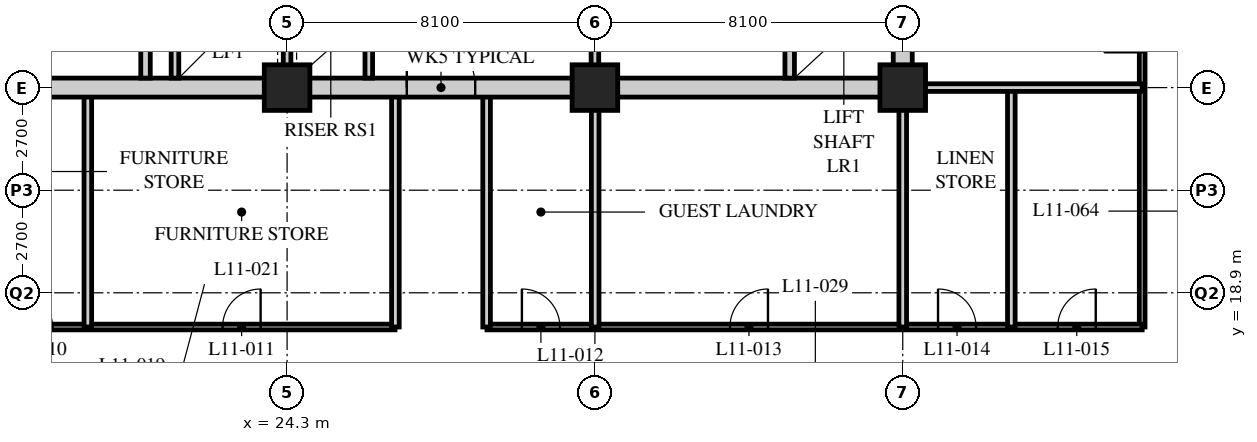
"""IFC4 building model, lengths in metres.
Left out: names, types, materials, properties, quantities, classifications, styles, units other than length and angle.
Written with IfcOpenShell. Run it as: python <this file> out.ifc"""

import sys

from ifc_helpers import new_model, si_unit, direction, frame, frame_2d, origin, origin_2d, place, context, subcontext, project, spatial, rectangle, hollow_rectangle, extrude, element, fill, save


model = new_model("IFC4")
c1 = context("Model", 3, precision=1e-05, world=origin(), true_north=direction((0.0, 1.0)))
c2 = subcontext(c1, "Body", "Model", "MODEL_VIEW")
j1 = project(units=[si_unit("LENGTHUNIT", "METRE"), si_unit("PLANEANGLEUNIT", "RADIAN")], contexts=[c1])
p1 = place(None, origin())
s1 = spatial("IfcSite", under=j1, at=p1, CompositionType="ELEMENT")
p2 = place(p1, origin())
s2 = spatial("IfcBuilding", under=s1, at=p2, CompositionType="ELEMENT")
p3 = place(p2, frame((0.0, 0.0, 50.0)))
s3 = spatial("IfcBuildingStorey", under=s2, at=p3, CompositionType="ELEMENT", Elevation=50.0)
for number, where, z_axis, x_axis in (
    (1, (24.3, 24.3, 0.0), (0.0, 0.0, 1.0), (1.0, 0.0, 0.0)),
    (2, (32.4, 24.3, 0.0), (0.0, 0.0, 1.0), (1.0, 0.0, 0.0)),
    (3, (40.5, 24.3, 0.0), (0.0, 0.0, 1.0), (1.0, 0.0, 0.0)),
):
    element("IfcColumn", number, at=place(p3, frame(where, z_axis=z_axis, x_axis=x_axis)), inside=s3, PredefinedType="COLUMN", context=c2, shape_type="SweptSolid", body=[
        extrude(hollow_rectangle(XDim=1.2, YDim=1.2, WallThickness=0.12, at=origin_2d()), origin(), (0.0, 0.0, 1.0), 3.4),
    ])
p4 = place(p3, frame((46.8, 18.0, 0.0), z_axis=(0.0, 0.0, 1.0), x_axis=(0.0, 1.0, 0.0)))
e4 = element("IfcWall", 4, at=p4, inside=s3, PredefinedType="PARTITIONING", context=c2, shape_type="SweptSolid", body=[
    extrude(rectangle(XDim=22.5, YDim=0.15, at=frame_2d((11.25, 0.0))), origin(), (0.0, 0.0, 1.0), 3.19),
])
p5 = place(p4, frame((7.229, 0.0, 0.0)))
e5 = element("IfcOpeningElement", 5, at=p5, cuts=e4, PredefinedType="OPENING", context=c2, shape_type="SweptSolid", body=[
    extrude(rectangle(XDim=1.0, YDim=2.1, at=frame_2d((0.5, 1.05))), frame((0.0, 0.085, 0.0), z_axis=(0.0, -1.0, 0.0), x_axis=(1.0, 0.0, 0.0)), (0.0, 0.0, 1.0), 0.17),
])
p6 = place(p4, frame((11.279, 0.0, 0.0)))
e6 = element("IfcOpeningElement", 6, at=p6, cuts=e4, PredefinedType="OPENING", context=c2, shape_type="SweptSolid", body=[
    extrude(rectangle(XDim=1.0, YDim=2.1, at=frame_2d((0.5, 1.05))), frame((0.0, 0.085, 0.0), z_axis=(0.0, -1.0, 0.0), x_axis=(1.0, 0.0, 0.0)), (0.0, 0.0, 1.0), 0.17),
])
p7 = place(p4, frame((17.95, 0.0, 0.0)))
e7 = element("IfcOpeningElement", 7, at=p7, cuts=e4, PredefinedType="OPENING", context=c2, shape_type="SweptSolid", body=[
    extrude(rectangle(XDim=1.0, YDim=2.1, at=frame_2d((0.5, 1.05))), frame((0.0, 0.085, 0.0), z_axis=(0.0, -1.0, 0.0), x_axis=(1.0, 0.0, 0.0)), (0.0, 0.0, 1.0), 0.17),
])
p8 = place(p3, frame((9.9, 18.0, 0.0), z_axis=(0.0, 0.0, 1.0), x_axis=(1.0, 0.0, 0.0)))
e8 = element("IfcWall", 8, at=p8, inside=s3, PredefinedType="PARTITIONING", context=c2, shape_type="SweptSolid", body=[
    extrude(rectangle(XDim=17.24, YDim=0.15, at=frame_2d((8.62, 0.0))), origin(), (0.0, 0.0, 1.0), 3.19),
])
p9 = place(p8, frame((0.3, 0.0, 0.0)))
e9 = element("IfcOpeningElement", 9, at=p9, cuts=e8, PredefinedType="OPENING", context=c2, shape_type="SweptSolid", body=[
    extrude(rectangle(XDim=1.0, YDim=2.1, at=frame_2d((0.5, 1.05))), frame((0.0, 0.085, 0.0), z_axis=(0.0, -1.0, 0.0), x_axis=(1.0, 0.0, 0.0)), (0.0, 0.0, 1.0), 0.17),
])
p10 = place(p8, frame((3.45, 0.0, 0.0)))
e10 = element("IfcOpeningElement", 10, at=p10, cuts=e8, PredefinedType="OPENING", context=c2, shape_type="SweptSolid", body=[
    extrude(rectangle(XDim=1.0, YDim=2.1, at=frame_2d((0.5, 1.05))), frame((0.0, 0.085, 0.0), z_axis=(0.0, -1.0, 0.0), x_axis=(1.0, 0.0, 0.0)), (0.0, 0.0, 1.0), 0.17),
])
p11 = place(p8, frame((7.229, 0.0, 0.0)))
e11 = element("IfcOpeningElement", 11, at=p11, cuts=e8, PredefinedType="OPENING", context=c2, shape_type="SweptSolid", body=[
    extrude(rectangle(XDim=1.0, YDim=2.1, at=frame_2d((0.5, 1.05))), frame((0.0, 0.085, 0.0), z_axis=(0.0, -1.0, 0.0), x_axis=(1.0, 0.0, 0.0)), (0.0, 0.0, 1.0), 0.17),
])
p12 = place(p8, frame((12.704, 0.0, 0.0)))
e12 = element("IfcOpeningElement", 12, at=p12, cuts=e8, PredefinedType="OPENING", context=c2, shape_type="SweptSolid", body=[
    extrude(rectangle(XDim=1.0, YDim=2.1, at=frame_2d((0.5, 1.05))), frame((0.0, 0.085, 0.0), z_axis=(0.0, -1.0, 0.0), x_axis=(1.0, 0.0, 0.0)), (0.0, 0.0, 1.0), 0.17),
])
p13 = place(p3, frame((29.56, 18.0, 0.0), z_axis=(0.0, 0.0, 1.0), x_axis=(1.0, 0.0, 0.0)))
e13 = element("IfcWall", 13, at=p13, inside=s3, PredefinedType="PARTITIONING", context=c2, shape_type="SweptSolid", body=[
    extrude(rectangle(XDim=17.24, YDim=0.15, at=frame_2d((8.62, 0.0))), origin(), (0.0, 0.0, 1.0), 3.19),
])
p14 = place(p13, frame((0.919, 0.0, 0.0)))
e14 = element("IfcOpeningElement", 14, at=p14, cuts=e13, PredefinedType="OPENING", context=c2, shape_type="SweptSolid", body=[
    extrude(rectangle(XDim=1.0, YDim=2.1, at=frame_2d((0.5, 1.05))), frame((0.0, 0.085, 0.0), z_axis=(0.0, -1.0, 0.0), x_axis=(1.0, 0.0, 0.0)), (0.0, 0.0, 1.0), 0.17),
])
p15 = place(p13, frame((6.394, 0.0, 0.0)))
e15 = element("IfcOpeningElement", 15, at=p15, cuts=e13, PredefinedType="OPENING", context=c2, shape_type="SweptSolid", body=[
    extrude(rectangle(XDim=1.0, YDim=2.1, at=frame_2d((0.5, 1.05))), frame((0.0, 0.085, 0.0), z_axis=(0.0, -1.0, 0.0), x_axis=(1.0, 0.0, 0.0)), (0.0, 0.0, 1.0), 0.17),
])
p16 = place(p13, frame((11.869, 0.0, 0.0)))
e16 = element("IfcOpeningElement", 16, at=p16, cuts=e13, PredefinedType="OPENING", context=c2, shape_type="SweptSolid", body=[
    extrude(rectangle(XDim=1.0, YDim=2.1, at=frame_2d((0.5, 1.05))), frame((0.0, 0.085, 0.0), z_axis=(0.0, -1.0, 0.0), x_axis=(1.0, 0.0, 0.0)), (0.0, 0.0, 1.0), 0.17),
])
p17 = place(p13, frame((15.019, 0.0, 0.0)))
e17 = element("IfcOpeningElement", 17, at=p17, cuts=e13, PredefinedType="OPENING", context=c2, shape_type="SweptSolid", body=[
    extrude(rectangle(XDim=1.0, YDim=2.1, at=frame_2d((0.5, 1.05))), frame((0.0, 0.085, 0.0), z_axis=(0.0, -1.0, 0.0), x_axis=(1.0, 0.0, 0.0)), (0.0, 0.0, 1.0), 0.17),
])
p18 = place(p3, frame((19.057, 18.0, 0.0), z_axis=(0.0, 0.0, 1.0), x_axis=(0.0, 1.0, 0.0)))
e18 = element("IfcWall", 18, at=p18, inside=s3, PredefinedType="SOLIDWALL", context=c2, shape_type="SweptSolid", body=[
    extrude(rectangle(XDim=6.3, YDim=0.2, at=frame_2d((3.15, 0.0))), origin(), (0.0, 0.0, 1.0), 3.19),
])
for number, where, z_axis, x_axis in (
    (19, (40.5, 18.0, 0.0), (0.0, 0.0, 1.0), (0.0, 1.0, 0.0)),
    (20, (32.407, 18.0, 0.0), (0.0, 0.0, 1.0), (0.0, 1.0, 0.0)),
):
    element("IfcWall", number, at=place(p3, frame(where, z_axis=z_axis, x_axis=x_axis)), inside=s3, PredefinedType="SOLIDWALL", context=c2, shape_type="SweptSolid", body=[
        extrude(rectangle(XDim=6.3, YDim=0.2, at=frame_2d((3.15, 0.0))), origin(), (0.0, 0.0, 1.0), 2.578),
    ])
for number, where, z_axis, x_axis in (
    (21, (43.357, 18.0, 0.0), (0.0, 0.0, 1.0), (0.0, 1.0, 0.0)),
    (22, (27.15, 18.0, 0.0), (0.0, 0.0, 1.0), (0.0, 1.0, 0.0)),
    (23, (29.55, 18.0, 0.0), (0.0, 0.0, 1.0), (0.0, 1.0, 0.0)),
):
    element("IfcWall", number, at=place(p3, frame(where, z_axis=z_axis, x_axis=x_axis)), inside=s3, PredefinedType="SOLIDWALL", context=c2, shape_type="SweptSolid", body=[
        extrude(rectangle(XDim=6.3, YDim=0.2, at=frame_2d((3.15, 0.0))), origin(), (0.0, 0.0, 1.0), 3.19),
    ])
p19 = place(p3, frame((40.5, 24.3, 0.0), z_axis=(0.0, 0.0, 1.0), x_axis=(1.0, 0.0, 0.0)))
e24 = element("IfcWall", 24, at=p19, inside=s3, PredefinedType="SOLIDWALL", context=c2, shape_type="SweptSolid", body=[
    extrude(rectangle(XDim=6.3, YDim=0.2, at=frame_2d((3.15, 0.0))), origin(), (0.0, 0.0, 1.0), 2.578),
])
p20 = place(p3, frame((15.95, 24.3, 0.0), z_axis=(0.0, 0.0, 1.0), x_axis=(1.0, 0.0, 0.0)))
e25 = element("IfcWall", 25, at=p20, inside=s3, PredefinedType="SOLIDWALL", context=c2, shape_type="SweptSolid", body=[
    extrude(rectangle(XDim=24.8, YDim=0.5, at=frame_2d((12.4, 0.0))), origin(), (0.0, 0.0, 1.0), 2.54),
])
p21 = place(p20, frame((11.5, 0.0, 0.0)))
e26 = element("IfcOpeningElement", 26, at=p21, cuts=e25, PredefinedType="OPENING", context=c2, shape_type="SweptSolid", body=[
    extrude(rectangle(XDim=1.8, YDim=2.4, at=frame_2d((0.9, 1.2))), frame((0.0, 0.26, 0.0), z_axis=(0.0, -1.0, 0.0), x_axis=(1.0, 0.0, 0.0)), (0.0, 0.0, 1.0), 0.52),
])
p22 = place(p3, frame((40.5, 24.55, 0.0), z_axis=(0.0, 0.0, 1.0), x_axis=(0.0, 1.0, 0.0)))
e27 = element("IfcWall", 27, at=p22, inside=s3, PredefinedType="SOLIDWALL", context=c2, shape_type="SweptSolid", body=[
    extrude(rectangle(XDim=15.7, YDim=0.5, at=frame_2d((7.85, 0.0))), origin(), (0.0, 0.0, 1.0), 2.578),
])
p23 = place(p3, frame((24.3, 24.55, 0.0), z_axis=(0.0, 0.0, 1.0), x_axis=(0.0, 1.0, 0.0)))
e28 = element("IfcWall", 28, at=p23, inside=s3, PredefinedType="SOLIDWALL", context=c2, shape_type="SweptSolid", body=[
    extrude(rectangle(XDim=7.75, YDim=0.2, at=frame_2d((3.875, 0.0))), origin(), (0.0, 0.0, 1.0), 2.578),
])
p24 = place(p23, frame((4.6, 0.0, 0.0)))
e29 = element("IfcOpeningElement", 29, at=p24, cuts=e28, PredefinedType="OPENING", context=c2, shape_type="SweptSolid", body=[
    extrude(rectangle(XDim=1.2, YDim=2.1, at=frame_2d((0.6, 1.05))), frame((0.0, 0.11, 0.0), z_axis=(0.0, -1.0, 0.0), x_axis=(1.0, 0.0, 0.0)), (0.0, 0.0, 1.0), 0.22),
])
p25 = place(p3, frame((20.575, 24.55, 0.0), z_axis=(0.0, 0.0, 1.0), x_axis=(0.0, 1.0, 0.0)))
e30 = element("IfcWall", 30, at=p25, inside=s3, PredefinedType="SOLIDWALL", context=c2, shape_type="SweptSolid", body=[
    extrude(rectangle(XDim=7.75, YDim=0.25, at=frame_2d((3.875, 0.0))), origin(), (0.0, 0.0, 1.0), 3.19),
])
p26 = place(p25, frame((6.2, 0.0, 0.0)))
e31 = element("IfcOpeningElement", 31, at=p26, cuts=e30, PredefinedType="OPENING", context=c2, shape_type="SweptSolid", body=[
    extrude(rectangle(XDim=1.2, YDim=2.1, at=frame_2d((0.6, 1.05))), frame((0.0, 0.135, 0.0), z_axis=(0.0, -1.0, 0.0), x_axis=(1.0, 0.0, 0.0)), (0.0, 0.0, 1.0), 0.27),
])
p27 = place(p3, frame((21.35, 24.55, 0.0), z_axis=(0.0, 0.0, 1.0), x_axis=(0.0, 1.0, 0.0)))
e32 = element("IfcWall", 32, at=p27, inside=s3, PredefinedType="SOLIDWALL", context=c2, shape_type="SweptSolid", body=[
    extrude(rectangle(XDim=2.6, YDim=0.2, at=frame_2d((1.3, 0.0))), origin(), (0.0, 0.0, 1.0), 3.19),
])
p28 = place(p3, frame((26.45, 24.55, 0.0), z_axis=(0.0, 0.0, 1.0), x_axis=(0.0, 1.0, 0.0)))
e33 = element("IfcWall", 33, at=p28, inside=s3, PredefinedType="SOLIDWALL", context=c2, shape_type="SweptSolid", body=[
    extrude(rectangle(XDim=1.6, YDim=0.2, at=frame_2d((0.8, 0.0))), origin(), (0.0, 0.0, 1.0), 3.19),
])
p29 = place(p3, frame((37.525, 24.55, 0.0), z_axis=(0.0, 0.0, 1.0), x_axis=(0.0, 1.0, 0.0)))
e34 = element("IfcWall", 34, at=p29, inside=s3, PredefinedType="SOLIDWALL", context=c2, shape_type="SweptSolid", body=[
    extrude(rectangle(XDim=7.75, YDim=0.25, at=frame_2d((3.875, 0.0))), origin(), (0.0, 0.0, 1.0), 3.19),
])
p30 = place(p3, frame((32.4, 24.55, 0.0), z_axis=(0.0, 0.0, 1.0), x_axis=(0.0, 1.0, 0.0)))
e35 = element("IfcWall", 35, at=p30, inside=s3, PredefinedType="PARTITIONING", context=c2, shape_type="SweptSolid", body=[
    extrude(rectangle(XDim=7.75, YDim=0.2, at=frame_2d((3.875, 0.0))), origin(), (0.0, 0.0, 1.0), 2.578),
])
p31 = place(p30, frame((0.925, 0.0, 0.0)))
e36 = element("IfcOpeningElement", 36, at=p31, cuts=e35, PredefinedType="OPENING", context=c2, shape_type="SweptSolid", body=[
    extrude(rectangle(XDim=0.9, YDim=2.1, at=frame_2d((0.45, 1.05))), frame((0.0, 0.11, 0.0), z_axis=(0.0, -1.0, 0.0), x_axis=(1.0, 0.0, 0.0)), (0.0, 0.0, 1.0), 0.22),
])
p32 = place(p30, frame((3.275, 0.0, 0.0)))
e37 = element("IfcOpeningElement", 37, at=p32, cuts=e35, PredefinedType="OPENING", context=c2, shape_type="SweptSolid", body=[
    extrude(rectangle(XDim=1.0, YDim=2.1, at=frame_2d((0.5, 1.05))), frame((0.0, 0.11, 0.0), z_axis=(0.0, -1.0, 0.0), x_axis=(1.0, 0.0, 0.0)), (0.0, 0.0, 1.0), 0.22),
])
p33 = place(p30, frame((5.775, 0.0, 0.0)))
e38 = element("IfcOpeningElement", 38, at=p33, cuts=e35, PredefinedType="OPENING", context=c2, shape_type="SweptSolid", body=[
    extrude(rectangle(XDim=1.0, YDim=2.1, at=frame_2d((0.5, 1.05))), frame((0.0, 0.11, 0.0), z_axis=(0.0, -1.0, 0.0), x_axis=(1.0, 0.0, 0.0)), (0.0, 0.0, 1.0), 0.22),
])
p34 = place(p12, origin())
e39 = element("IfcDoor", 39, at=p34, inside=s3, OperationType="SINGLE_SWING_RIGHT", PredefinedType="DOOR", context=c2, shape_type="SweptSolid", body=[
    extrude(rectangle(XDim=1.0, YDim=2.1, at=frame_2d((0.5, 1.05))), frame((0.0, 0.025, 0.0), z_axis=(0.0, -1.0, 0.0), x_axis=(1.0, 0.0, 0.0)), (0.0, 0.0, 1.0), 0.05),
])
fill(e12, e39)
p35 = place(p14, origin())
e40 = element("IfcDoor", 40, at=p35, inside=s3, OperationType="SINGLE_SWING_LEFT", PredefinedType="DOOR", context=c2, shape_type="SweptSolid", body=[
    extrude(rectangle(XDim=1.0, YDim=2.1, at=frame_2d((0.5, 1.05))), frame((0.0, 0.025, 0.0), z_axis=(0.0, -1.0, 0.0), x_axis=(1.0, 0.0, 0.0)), (0.0, 0.0, 1.0), 0.05),
])
fill(e14, e40)
p36 = place(p15, origin())
e41 = element("IfcDoor", 41, at=p36, inside=s3, OperationType="SINGLE_SWING_RIGHT", PredefinedType="DOOR", context=c2, shape_type="SweptSolid", body=[
    extrude(rectangle(XDim=1.0, YDim=2.1, at=frame_2d((0.5, 1.05))), frame((0.0, 0.025, 0.0), z_axis=(0.0, -1.0, 0.0), x_axis=(1.0, 0.0, 0.0)), (0.0, 0.0, 1.0), 0.05),
])
fill(e15, e41)
p37 = place(p16, origin())
e42 = element("IfcDoor", 42, at=p37, inside=s3, OperationType="SINGLE_SWING_LEFT", PredefinedType="DOOR", context=c2, shape_type="SweptSolid", body=[
    extrude(rectangle(XDim=1.0, YDim=2.1, at=frame_2d((0.5, 1.05))), frame((0.0, 0.025, 0.0), z_axis=(0.0, -1.0, 0.0), x_axis=(1.0, 0.0, 0.0)), (0.0, 0.0, 1.0), 0.05),
])
fill(e16, e42)
p38 = place(p17, origin())
e43 = element("IfcDoor", 43, at=p38, inside=s3, OperationType="SINGLE_SWING_RIGHT", PredefinedType="DOOR", context=c2, shape_type="SweptSolid", body=[
    extrude(rectangle(XDim=1.0, YDim=2.1, at=frame_2d((0.5, 1.05))), frame((0.0, 0.025, 0.0), z_axis=(0.0, -1.0, 0.0), x_axis=(1.0, 0.0, 0.0)), (0.0, 0.0, 1.0), 0.05),
])
fill(e17, e43)
p39 = place(p21, origin())
e44 = element("IfcDoor", 44, at=p39, inside=s3, OperationType="DOUBLE_DOOR_SINGLE_SWING", PredefinedType="DOOR", context=c2, shape_type="SweptSolid", body=[
    extrude(rectangle(XDim=1.8, YDim=2.4, at=frame_2d((0.9, 1.2))), frame((0.0, 0.025, 0.0), z_axis=(0.0, -1.0, 0.0), x_axis=(1.0, 0.0, 0.0)), (0.0, 0.0, 1.0), 0.05),
])
fill(e26, e44)
save(model, sys.argv[1])
